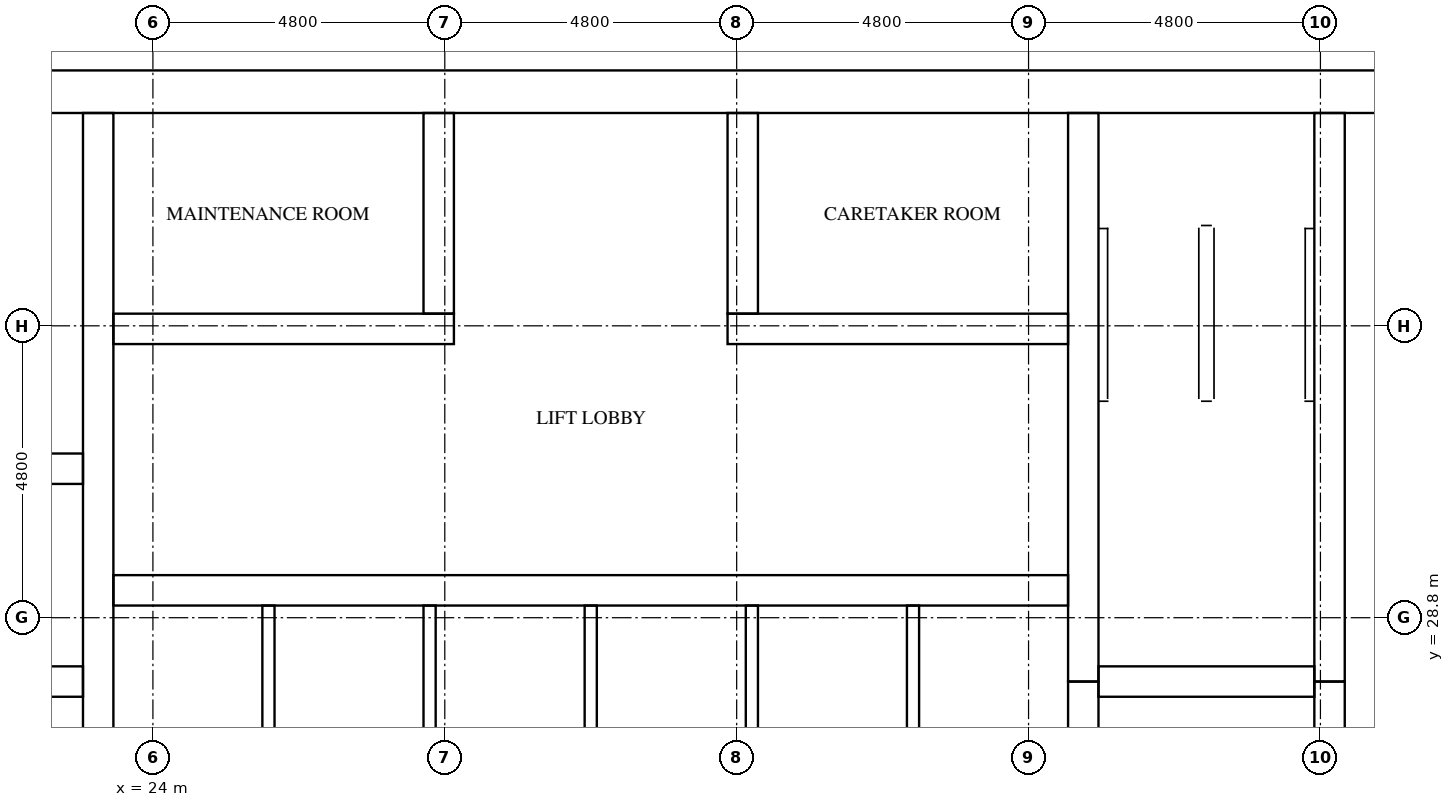
"""IFC4 building model, lengths in metres.
Left out: names, types, materials, properties, quantities, classifications, styles, units other than length and angle.
Written with IfcOpenShell. Run it as: python <this file> out.ifc"""

import sys

from ifc_helpers import new_model, si_unit, direction, frame, frame_2d, origin, place, context, subcontext, project, spatial, rectangle, extrude, element, fill, save


model = new_model("IFC4")
c1 = context("Model", 3, precision=1e-05, world=origin(), true_north=direction((0.0, 1.0)))
c2 = subcontext(c1, "Body", "Model", "MODEL_VIEW")
j1 = project(units=[si_unit("LENGTHUNIT", "METRE"), si_unit("PLANEANGLEUNIT", "RADIAN")], contexts=[c1])
p1 = place(None, origin())
s1 = spatial("IfcSite", under=j1, at=p1, CompositionType="ELEMENT")
p2 = place(p1, origin())
s2 = spatial("IfcBuilding", under=s1, at=p2, CompositionType="ELEMENT")
p3 = place(p2, frame((0.0, 0.0, 196.4)))
s3 = spatial("IfcBuildingStorey", under=s2, at=p3, CompositionType="ELEMENT", Elevation=196.4)
p4 = place(p3, frame((15.0, 37.45, 0.0), z_axis=(0.0, 0.0, 1.0), x_axis=(1.0, 0.0, 0.0)))
e1 = element("IfcWall", 1, at=p4, inside=s3, PredefinedType="SHEAR", context=c2, shape_type="SweptSolid", body=[
    extrude(rectangle(XDim=32.4, YDim=0.7, at=frame_2d((16.2, 0.0))), origin(), (0.0, 0.0, 1.0), 3.2),
])
p5 = place(p4, frame((15.3, 0.0, 0.0)))
e2 = element("IfcOpeningElement", 2, at=p5, cuts=e1, PredefinedType="OPENING", context=c2, shape_type="SweptSolid", body=[
    extrude(rectangle(XDim=1.8, YDim=2.1, at=frame_2d((0.9, 1.05))), frame((0.0, 0.36, 0.0), z_axis=(0.0, -1.0, 0.0), x_axis=(1.0, 0.0, 0.0)), (0.0, 0.0, 1.0), 0.72),
])
p6 = place(p4, frame((1.544, 0.0, 0.0)))
e3 = element("IfcOpeningElement", 3, at=p6, cuts=e1, PredefinedType="OPENING", context=c2, shape_type="SweptSolid", body=[
    extrude(rectangle(XDim=1.0, YDim=2.1, at=frame_2d((0.5, 1.05))), frame((0.0, 0.36, 0.0), z_axis=(0.0, -1.0, 0.0), x_axis=(1.0, 0.0, 0.0)), (0.0, 0.0, 1.0), 0.72),
])
p7 = place(p4, frame((5.219, 0.0, 0.0)))
e4 = element("IfcOpeningElement", 4, at=p7, cuts=e1, PredefinedType="OPENING", context=c2, shape_type="SweptSolid", body=[
    extrude(rectangle(XDim=1.0, YDim=2.1, at=frame_2d((0.5, 1.05))), frame((0.0, 0.36, 0.0), z_axis=(0.0, -1.0, 0.0), x_axis=(1.0, 0.0, 0.0)), (0.0, 0.0, 1.0), 0.72),
])
p8 = place(p3, frame((23.1, 15.7, 0.0), z_axis=(0.0, 0.0, 1.0), x_axis=(0.0, 1.0, 0.0)))
e5 = element("IfcWall", 5, at=p8, inside=s3, PredefinedType="SHEAR", context=c2, shape_type="SweptSolid", body=[
    extrude(rectangle(XDim=21.4, YDim=0.5, at=frame_2d((10.7, 0.0))), origin(), (0.0, 0.0, 1.0), 3.2),
])
p9 = place(p3, frame((39.3, 24.25, 0.0), z_axis=(0.0, 0.0, 1.0), x_axis=(0.0, 1.0, 0.0)))
e6 = element("IfcWall", 6, at=p9, inside=s3, PredefinedType="SHEAR", context=c2, shape_type="SweptSolid", body=[
    extrude(rectangle(XDim=3.5, YDim=0.5, at=frame_2d((1.75, 0.0))), origin(), (0.0, 0.0, 1.0), 3.2),
])
p10 = place(p3, frame((39.3, 27.75, 0.0), z_axis=(0.0, 0.0, 1.0), x_axis=(0.0, 1.0, 0.0)))
e7 = element("IfcWall", 7, at=p10, inside=s3, PredefinedType="SHEAR", context=c2, shape_type="SweptSolid", body=[
    extrude(rectangle(XDim=9.35, YDim=0.5, at=frame_2d((4.675, 0.0))), origin(), (0.0, 0.0, 1.0), 3.2),
])
p11 = place(p3, frame((43.35, 24.25, 0.0), z_axis=(0.0, 0.0, 1.0), x_axis=(0.0, 1.0, 0.0)))
e8 = element("IfcWall", 8, at=p11, inside=s3, PredefinedType="SHEAR", context=c2, shape_type="SweptSolid", body=[
    extrude(rectangle(XDim=3.5, YDim=0.5, at=frame_2d((1.75, 0.0))), origin(), (0.0, 0.0, 1.0), 3.2),
])
p12 = place(p11, frame((1.2, 0.0, 0.0)))
e9 = element("IfcOpeningElement", 9, at=p12, cuts=e8, PredefinedType="OPENING", context=c2, shape_type="SweptSolid", body=[
    extrude(rectangle(XDim=1.1, YDim=2.1, at=frame_2d((0.55, 1.05))), frame((0.0, 0.26, 0.0), z_axis=(0.0, -1.0, 0.0), x_axis=(1.0, 0.0, 0.0)), (0.0, 0.0, 1.0), 0.52),
])
p13 = place(p3, frame((43.35, 27.75, 0.0), z_axis=(0.0, 0.0, 1.0), x_axis=(0.0, 1.0, 0.0)))
e10 = element("IfcWall", 10, at=p13, inside=s3, PredefinedType="SHEAR", context=c2, shape_type="SweptSolid", body=[
    extrude(rectangle(XDim=9.35, YDim=0.5, at=frame_2d((4.675, 0.0))), origin(), (0.0, 0.0, 1.0), 3.2),
])
p14 = place(p13, frame((7.65, 0.0, 0.0)))
e11 = element("IfcOpeningElement", 11, at=p14, cuts=e10, PredefinedType="OPENING", context=c2, shape_type="SweptSolid", body=[
    extrude(rectangle(XDim=1.2, YDim=2.1, at=frame_2d((0.6, 1.05))), frame((0.0, 0.26, 0.0), z_axis=(0.0, -1.0, 0.0), x_axis=(1.0, 0.0, 0.0)), (0.0, 0.0, 1.0), 0.52),
])
p15 = place(p3, frame((19.3, 27.75, 0.0), z_axis=(0.0, 0.0, 1.0), x_axis=(1.0, 0.0, 0.0)))
e12 = element("IfcWall", 12, at=p15, inside=s3, PredefinedType="SHEAR", context=c2, shape_type="SweptSolid", body=[
    extrude(rectangle(XDim=3.55, YDim=0.5, at=frame_2d((1.775, 0.0))), origin(), (0.0, 0.0, 1.0), 3.2),
])
p16 = place(p3, frame((15.7, 31.25, 0.0), z_axis=(0.0, 0.0, 1.0), x_axis=(1.0, 0.0, 0.0)))
e13 = element("IfcWall", 13, at=p16, inside=s3, PredefinedType="SHEAR", context=c2, shape_type="SweptSolid", body=[
    extrude(rectangle(XDim=7.15, YDim=0.5, at=frame_2d((3.575, 0.0))), origin(), (0.0, 0.0, 1.0), 3.2),
])
p17 = place(p3, frame((39.55, 27.75, 0.0), z_axis=(0.0, 0.0, 1.0), x_axis=(1.0, 0.0, 0.0)))
e14 = element("IfcWall", 14, at=p17, inside=s3, PredefinedType="SHEAR", context=c2, shape_type="SweptSolid", body=[
    extrude(rectangle(XDim=3.55, YDim=0.5, at=frame_2d((1.775, 0.0))), origin(), (0.0, 0.0, 1.0), 3.2),
])
p18 = place(p3, frame((23.35, 29.25, 0.0), z_axis=(0.0, 0.0, 1.0), x_axis=(1.0, 0.0, 0.0)))
e15 = element("IfcWall", 15, at=p18, inside=s3, PredefinedType="SHEAR", context=c2, shape_type="SweptSolid", body=[
    extrude(rectangle(XDim=15.7, YDim=0.5, at=frame_2d((7.85, 0.0))), origin(), (0.0, 0.0, 1.0), 3.2),
])
p19 = place(p18, frame((0.675, 0.0, 0.0)))
e16 = element("IfcOpeningElement", 16, at=p19, cuts=e15, PredefinedType="OPENING", context=c2, shape_type="SweptSolid", body=[
    extrude(rectangle(XDim=1.1, YDim=2.1, at=frame_2d((0.55, 1.05))), frame((0.0, 0.26, 0.0), z_axis=(0.0, -1.0, 0.0), x_axis=(1.0, 0.0, 0.0)), (0.0, 0.0, 1.0), 0.52),
])
p20 = place(p18, frame((3.325, 0.0, 0.0)))
e17 = element("IfcOpeningElement", 17, at=p20, cuts=e15, PredefinedType="OPENING", context=c2, shape_type="SweptSolid", body=[
    extrude(rectangle(XDim=1.1, YDim=2.1, at=frame_2d((0.55, 1.05))), frame((0.0, 0.26, 0.0), z_axis=(0.0, -1.0, 0.0), x_axis=(1.0, 0.0, 0.0)), (0.0, 0.0, 1.0), 0.52),
])
p21 = place(p18, frame((5.975, 0.0, 0.0)))
e18 = element("IfcOpeningElement", 18, at=p21, cuts=e15, PredefinedType="OPENING", context=c2, shape_type="SweptSolid", body=[
    extrude(rectangle(XDim=1.1, YDim=2.1, at=frame_2d((0.55, 1.05))), frame((0.0, 0.26, 0.0), z_axis=(0.0, -1.0, 0.0), x_axis=(1.0, 0.0, 0.0)), (0.0, 0.0, 1.0), 0.52),
])
p22 = place(p18, frame((8.625, 0.0, 0.0)))
e19 = element("IfcOpeningElement", 19, at=p22, cuts=e15, PredefinedType="OPENING", context=c2, shape_type="SweptSolid", body=[
    extrude(rectangle(XDim=1.1, YDim=2.1, at=frame_2d((0.55, 1.05))), frame((0.0, 0.26, 0.0), z_axis=(0.0, -1.0, 0.0), x_axis=(1.0, 0.0, 0.0)), (0.0, 0.0, 1.0), 0.52),
])
p23 = place(p18, frame((11.275, 0.0, 0.0)))
e20 = element("IfcOpeningElement", 20, at=p23, cuts=e15, PredefinedType="OPENING", context=c2, shape_type="SweptSolid", body=[
    extrude(rectangle(XDim=1.1, YDim=2.1, at=frame_2d((0.55, 1.05))), frame((0.0, 0.26, 0.0), z_axis=(0.0, -1.0, 0.0), x_axis=(1.0, 0.0, 0.0)), (0.0, 0.0, 1.0), 0.52),
])
p24 = place(p18, frame((13.925, 0.0, 0.0)))
e21 = element("IfcOpeningElement", 21, at=p24, cuts=e15, PredefinedType="OPENING", context=c2, shape_type="SweptSolid", body=[
    extrude(rectangle(XDim=1.1, YDim=2.1, at=frame_2d((0.55, 1.05))), frame((0.0, 0.26, 0.0), z_axis=(0.0, -1.0, 0.0), x_axis=(1.0, 0.0, 0.0)), (0.0, 0.0, 1.0), 0.52),
])
p25 = place(p3, frame((23.35, 33.55, 0.0), z_axis=(0.0, 0.0, 1.0), x_axis=(1.0, 0.0, 0.0)))
e22 = element("IfcWall", 22, at=p25, inside=s3, PredefinedType="SHEAR", context=c2, shape_type="SweptSolid", body=[
    extrude(rectangle(XDim=5.6, YDim=0.5, at=frame_2d((2.8, 0.0))), origin(), (0.0, 0.0, 1.0), 3.2),
])
p26 = place(p25, frame((2.05, 0.0, 0.0)))
e23 = element("IfcOpeningElement", 23, at=p26, cuts=e22, PredefinedType="OPENING", context=c2, shape_type="SweptSolid", body=[
    extrude(rectangle(XDim=1.0, YDim=2.1, at=frame_2d((0.5, 1.05))), frame((0.0, 0.26, 0.0), z_axis=(0.0, -1.0, 0.0), x_axis=(1.0, 0.0, 0.0)), (0.0, 0.0, 1.0), 0.52),
])
p27 = place(p3, frame((33.45, 33.55, 0.0), z_axis=(0.0, 0.0, 1.0), x_axis=(1.0, 0.0, 0.0)))
e24 = element("IfcWall", 24, at=p27, inside=s3, PredefinedType="SHEAR", context=c2, shape_type="SweptSolid", body=[
    extrude(rectangle(XDim=5.6, YDim=0.5, at=frame_2d((2.8, 0.0))), origin(), (0.0, 0.0, 1.0), 3.2),
])
p28 = place(p27, frame((2.55, 0.0, 0.0)))
e25 = element("IfcOpeningElement", 25, at=p28, cuts=e24, PredefinedType="OPENING", context=c2, shape_type="SweptSolid", body=[
    extrude(rectangle(XDim=1.0, YDim=2.1, at=frame_2d((0.5, 1.05))), frame((0.0, 0.26, 0.0), z_axis=(0.0, -1.0, 0.0), x_axis=(1.0, 0.0, 0.0)), (0.0, 0.0, 1.0), 0.52),
])
for number, where, z_axis, x_axis in (
    (26, (28.7, 33.8, 0.0), (0.0, 0.0, 1.0), (0.0, 1.0, 0.0)),
    (27, (33.7, 33.8, 0.0), (0.0, 0.0, 1.0), (0.0, 1.0, 0.0)),
):
    element("IfcWall", number, at=place(p3, frame(where, z_axis=z_axis, x_axis=x_axis)), inside=s3, PredefinedType="SHEAR", context=c2, shape_type="SweptSolid", body=[
        extrude(rectangle(XDim=3.3, YDim=0.5, at=frame_2d((1.65, 0.0))), origin(), (0.0, 0.0, 1.0), 3.2),
    ])
for number, where, z_axis, x_axis in (
    (28, (25.9, 26.4, 0.0), (0.0, 0.0, 1.0), (0.0, 1.0, 0.0)),
    (29, (28.55, 26.4, 0.0), (0.0, 0.0, 1.0), (0.0, 1.0, 0.0)),
    (30, (31.2, 26.4, 0.0), (0.0, 0.0, 1.0), (0.0, 1.0, 0.0)),
    (31, (33.85, 26.4, 0.0), (0.0, 0.0, 1.0), (0.0, 1.0, 0.0)),
    (32, (36.5, 26.4, 0.0), (0.0, 0.0, 1.0), (0.0, 1.0, 0.0)),
):
    element("IfcWall", number, at=place(p3, frame(where, z_axis=z_axis, x_axis=x_axis)), inside=s3, PredefinedType="SOLIDWALL", context=c2, shape_type="SweptSolid", body=[
        extrude(rectangle(XDim=2.6, YDim=0.2, at=frame_2d((1.3, 0.0))), origin(), (0.0, 0.0, 1.0), 3.2),
    ])
p29 = place(p19, origin())
e33 = element("IfcDoor", 33, at=p29, inside=s3, OperationType="DOUBLE_DOOR_SLIDING", PredefinedType="DOOR", context=c2, shape_type="SweptSolid", body=[
    extrude(rectangle(XDim=1.1, YDim=2.1, at=frame_2d((0.55, 1.05))), frame((0.0, 0.025, 0.0), z_axis=(0.0, -1.0, 0.0), x_axis=(1.0, 0.0, 0.0)), (0.0, 0.0, 1.0), 0.05),
])
fill(e16, e33)
p30 = place(p20, origin())
e34 = element("IfcDoor", 34, at=p30, inside=s3, OperationType="DOUBLE_DOOR_SLIDING", PredefinedType="DOOR", context=c2, shape_type="SweptSolid", body=[
    extrude(rectangle(XDim=1.1, YDim=2.1, at=frame_2d((0.55, 1.05))), frame((0.0, 0.025, 0.0), z_axis=(0.0, -1.0, 0.0), x_axis=(1.0, 0.0, 0.0)), (0.0, 0.0, 1.0), 0.05),
])
fill(e17, e34)
p31 = place(p21, origin())
e35 = element("IfcDoor", 35, at=p31, inside=s3, OperationType="DOUBLE_DOOR_SLIDING", PredefinedType="DOOR", context=c2, shape_type="SweptSolid", body=[
    extrude(rectangle(XDim=1.1, YDim=2.1, at=frame_2d((0.55, 1.05))), frame((0.0, 0.025, 0.0), z_axis=(0.0, -1.0, 0.0), x_axis=(1.0, 0.0, 0.0)), (0.0, 0.0, 1.0), 0.05),
])
fill(e18, e35)
p32 = place(p22, origin())
e36 = element("IfcDoor", 36, at=p32, inside=s3, OperationType="DOUBLE_DOOR_SLIDING", PredefinedType="DOOR", context=c2, shape_type="SweptSolid", body=[
    extrude(rectangle(XDim=1.1, YDim=2.1, at=frame_2d((0.55, 1.05))), frame((0.0, 0.025, 0.0), z_axis=(0.0, -1.0, 0.0), x_axis=(1.0, 0.0, 0.0)), (0.0, 0.0, 1.0), 0.05),
])
fill(e19, e36)
p33 = place(p23, origin())
e37 = element("IfcDoor", 37, at=p33, inside=s3, OperationType="DOUBLE_DOOR_SLIDING", PredefinedType="DOOR", context=c2, shape_type="SweptSolid", body=[
    extrude(rectangle(XDim=1.1, YDim=2.1, at=frame_2d((0.55, 1.05))), frame((0.0, 0.025, 0.0), z_axis=(0.0, -1.0, 0.0), x_axis=(1.0, 0.0, 0.0)), (0.0, 0.0, 1.0), 0.05),
])
fill(e20, e37)
p34 = place(p24, origin())
e38 = element("IfcDoor", 38, at=p34, inside=s3, OperationType="DOUBLE_DOOR_SLIDING", PredefinedType="DOOR", context=c2, shape_type="SweptSolid", body=[
    extrude(rectangle(XDim=1.1, YDim=2.1, at=frame_2d((0.55, 1.05))), frame((0.0, 0.025, 0.0), z_axis=(0.0, -1.0, 0.0), x_axis=(1.0, 0.0, 0.0)), (0.0, 0.0, 1.0), 0.05),
])
fill(e21, e38)
p35 = place(p14, origin())
e39 = element("IfcDoor", 39, at=p35, inside=s3, OperationType="SINGLE_SWING_LEFT", PredefinedType="DOOR", context=c2, shape_type="SweptSolid", body=[
    extrude(rectangle(XDim=1.2, YDim=2.1, at=frame_2d((0.6, 1.05))), frame((0.0, 0.025, 0.0), z_axis=(0.0, -1.0, 0.0), x_axis=(1.0, 0.0, 0.0)), (0.0, 0.0, 1.0), 0.05),
])
fill(e11, e39)
p36 = place(p5, origin())
e40 = element("IfcDoor", 40, at=p36, inside=s3, OperationType="DOUBLE_DOOR_SINGLE_SWING", PredefinedType="DOOR", context=c2, shape_type="SweptSolid", body=[
    extrude(rectangle(XDim=1.8, YDim=2.1, at=frame_2d((0.9, 1.05))), frame((0.0, 0.025, 0.0), z_axis=(0.0, -1.0, 0.0), x_axis=(1.0, 0.0, 0.0)), (0.0, 0.0, 1.0), 0.05),
])
fill(e2, e40)
p37 = place(p26, frame((1.0, 0.0, 0.0), z_axis=(0.0, 0.0, 1.0), x_axis=(-1.0, 0.0, 0.0)))
e41 = element("IfcDoor", 41, at=p37, inside=s3, OperationType="SINGLE_SWING_RIGHT", PredefinedType="DOOR", context=c2, shape_type="SweptSolid", body=[
    extrude(rectangle(XDim=1.0, YDim=2.1, at=frame_2d((0.5, 1.05))), frame((0.0, 0.025, 0.0), z_axis=(0.0, -1.0, 0.0), x_axis=(1.0, 0.0, 0.0)), (0.0, 0.0, 1.0), 0.05),
])
fill(e23, e41)
p38 = place(p28, frame((1.0, 0.0, 0.0), z_axis=(0.0, 0.0, 1.0), x_axis=(-1.0, 0.0, 0.0)))
e42 = element("IfcDoor", 42, at=p38, inside=s3, OperationType="SINGLE_SWING_LEFT", PredefinedType="DOOR", context=c2, shape_type="SweptSolid", body=[
    extrude(rectangle(XDim=1.0, YDim=2.1, at=frame_2d((0.5, 1.05))), frame((0.0, 0.025, 0.0), z_axis=(0.0, -1.0, 0.0), x_axis=(1.0, 0.0, 0.0)), (0.0, 0.0, 1.0), 0.05),
])
fill(e25, e42)
save(model, sys.argv[1])
